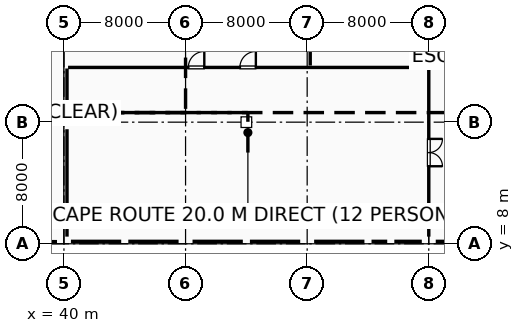
"""IFC4 building model, lengths in metres.
Left out: names, types, materials, properties, quantities, classifications, styles, units other than length and angle.
Written with IfcOpenShell. Run it as: python <this file> out.ifc"""

import sys

from ifc_helpers import new_model, si_unit, direction, frame, frame_2d, origin, origin_2d, place, context, subcontext, project, spatial, rectangle, circle, extrude, element, fill, save


model = new_model("IFC4")
c1 = context("Model", 3, precision=1e-05, world=origin(), true_north=direction((0.0, 1.0)))
c2 = subcontext(c1, "Body", "Model", "MODEL_VIEW")
j1 = project(units=[si_unit("LENGTHUNIT", "METRE"), si_unit("PLANEANGLEUNIT", "RADIAN")], contexts=[c1])
p1 = place(None, origin())
s1 = spatial("IfcSite", under=j1, at=p1, CompositionType="ELEMENT")
p2 = place(p1, origin())
s2 = spatial("IfcBuilding", under=s1, at=p2, CompositionType="ELEMENT")
p3 = place(p2, origin())
s3 = spatial("IfcBuildingStorey", under=s2, at=p3, CompositionType="ELEMENT", Elevation=0.0)
for number, where, z_axis, x_axis in (
    (1, (40.0, 8.0, 0.0), (0.0, 0.0, 1.0), (1.0, 0.0, 0.0)),
    (2, (40.0, 16.0, 0.0), (0.0, 0.0, 1.0), (1.0, 0.0, 0.0)),
):
    element("IfcColumn", number, at=place(p3, frame(where, z_axis=z_axis, x_axis=x_axis)), inside=s3, PredefinedType="COLUMN", context=c2, shape_type="SweptSolid", body=[
        extrude(rectangle(XDim=0.9, YDim=0.9, at=origin_2d()), origin(), (0.0, 0.0, 1.0), 5.4),
    ])
p4 = place(p3, frame((48.0, 8.0, 0.0), z_axis=(0.0, 0.0, 1.0), x_axis=(1.0, 0.0, 0.0)))
e3 = element("IfcColumn", 3, at=p4, inside=s3, PredefinedType="COLUMN", context=c2, shape_type="SweptSolid", body=[
    extrude(circle(Radius=0.45, at=origin_2d()), origin(), (0.0, 0.0, 1.0), 5.4),
])
p5 = place(p3, frame((48.0, 16.0, 0.0), z_axis=(0.0, 0.0, 1.0), x_axis=(1.0, 0.0, 0.0)))
e4 = element("IfcColumn", 4, at=p5, inside=s3, PredefinedType="COLUMN", context=c2, shape_type="SweptSolid", body=[
    extrude(rectangle(XDim=0.75, YDim=0.75, at=origin_2d()), origin(), (0.0, 0.0, 1.0), 5.4),
])
p6 = place(p3, frame((56.0, 8.0, 0.0), z_axis=(0.0, 0.0, 1.0), x_axis=(1.0, 0.0, 0.0)))
e5 = element("IfcColumn", 5, at=p6, inside=s3, PredefinedType="COLUMN", context=c2, shape_type="SweptSolid", body=[
    extrude(circle(Radius=0.45, at=origin_2d()), origin(), (0.0, 0.0, 1.0), 5.4),
])
p7 = place(p3, frame((56.0, 16.0, 0.0), z_axis=(0.0, 0.0, 1.0), x_axis=(1.0, 0.0, 0.0)))
e6 = element("IfcColumn", 6, at=p7, inside=s3, PredefinedType="COLUMN", context=c2, shape_type="SweptSolid", body=[
    extrude(rectangle(XDim=0.75, YDim=0.75, at=origin_2d()), origin(), (0.0, 0.0, 1.0), 5.4),
])
p8 = place(p3, frame((64.0, 8.0, 0.0), z_axis=(0.0, 0.0, 1.0), x_axis=(1.0, 0.0, 0.0)))
e7 = element("IfcColumn", 7, at=p8, inside=s3, PredefinedType="COLUMN", context=c2, shape_type="SweptSolid", body=[
    extrude(rectangle(XDim=0.9, YDim=0.9, at=origin_2d()), origin(), (0.0, 0.0, 1.0), 5.4),
])
for number, where, z_axis, x_axis in (
    (8, (44.0, 8.0, 0.0), (0.0, 0.0, 1.0), (1.0, 0.0, 0.0)),
    (9, (52.0, 8.0, 0.0), (0.0, 0.0, 1.0), (1.0, 0.0, 0.0)),
    (10, (60.0, 8.0, 0.0), (0.0, 0.0, 1.0), (1.0, 0.0, 0.0)),
):
    element("IfcColumn", number, at=place(p3, frame(where, z_axis=z_axis, x_axis=x_axis)), inside=s3, PredefinedType="COLUMN", context=c2, shape_type="SweptSolid", body=[
        extrude(rectangle(XDim=0.45, YDim=0.45, at=origin_2d()), origin(), (0.0, 0.0, 1.0), 5.4),
    ])
p9 = place(p3, frame((61.5, 8.0, 0.0), z_axis=(0.0, 0.0, 1.0), x_axis=(1.0, 0.0, 0.0)))
e11 = element("IfcColumn", 11, at=p9, inside=s3, PredefinedType="COLUMN", context=c2, shape_type="SweptSolid", body=[
    extrude(rectangle(XDim=0.45, YDim=0.45, at=origin_2d()), origin(), (0.0, 0.0, 1.0), 5.36),
])
p10 = place(p3, frame((71.342, 8.16, 0.0), z_axis=(0.0, 0.0, 1.0), x_axis=(-1.0, 0.0, 0.0)))
e12 = element("IfcWall", 12, at=p10, inside=s3, PredefinedType="STANDARD", context=c2, shape_type="SweptSolid", body=[
    extrude(rectangle(XDim=6.884, YDim=0.28, at=frame_2d((3.442, 0.0))), origin(), (0.0, 0.0, 1.0), 4.655),
])
p11 = place(p10, frame((2.542, 0.0, 0.95)))
e13 = element("IfcOpeningElement", 13, at=p11, cuts=e12, PredefinedType="OPENING", context=c2, shape_type="SweptSolid", body=[
    extrude(rectangle(XDim=1.8, YDim=1.2, at=frame_2d((0.9, 0.6))), frame((0.0, 0.15, 0.0), z_axis=(0.0, -1.0, 0.0), x_axis=(1.0, 0.0, 0.0)), (0.0, 0.0, 1.0), 0.3),
])
p12 = place(p3, frame((63.542, 8.16, 0.0), z_axis=(0.0, 0.0, 1.0), x_axis=(-1.0, 0.0, 0.0)))
e14 = element("IfcWall", 14, at=p12, inside=s3, PredefinedType="STANDARD", context=c2, shape_type="SweptSolid", body=[
    extrude(rectangle(XDim=1.809, YDim=0.28, at=frame_2d((0.905, 0.0))), origin(), (0.0, 0.0, 1.0), 5.12),
])
p13 = place(p3, frame((61.267, 8.16, 0.0), z_axis=(0.0, 0.0, 1.0), x_axis=(-1.0, 0.0, 0.0)))
e15 = element("IfcWall", 15, at=p13, inside=s3, PredefinedType="STANDARD", context=c2, shape_type="SweptSolid", body=[
    extrude(rectangle(XDim=1.034, YDim=0.28, at=frame_2d((0.517, 0.0))), origin(), (0.0, 0.0, 1.0), 5.12),
])
p14 = place(p3, frame((59.767, 8.16, 0.0), z_axis=(0.0, 0.0, 1.0), x_axis=(-1.0, 0.0, 0.0)))
e16 = element("IfcWall", 16, at=p14, inside=s3, PredefinedType="STANDARD", context=c2, shape_type="SweptSolid", body=[
    extrude(rectangle(XDim=3.309, YDim=0.28, at=frame_2d((1.655, 0.0))), origin(), (0.0, 0.0, 1.0), 4.455),
])
p15 = place(p3, frame((55.542, 8.16, 0.0), z_axis=(0.0, 0.0, 1.0), x_axis=(-1.0, 0.0, 0.0)))
e17 = element("IfcWall", 17, at=p15, inside=s3, PredefinedType="STANDARD", context=c2, shape_type="SweptSolid", body=[
    extrude(rectangle(XDim=3.309, YDim=0.28, at=frame_2d((1.655, 0.0))), origin(), (0.0, 0.0, 1.0), 4.355),
])
p16 = place(p3, frame((51.767, 8.16, 0.0), z_axis=(0.0, 0.0, 1.0), x_axis=(-1.0, 0.0, 0.0)))
e18 = element("IfcWall", 18, at=p16, inside=s3, PredefinedType="STANDARD", context=c2, shape_type="SweptSolid", body=[
    extrude(rectangle(XDim=3.309, YDim=0.28, at=frame_2d((1.655, 0.0))), origin(), (0.0, 0.0, 1.0), 4.255),
])
p17 = place(p3, frame((47.542, 8.16, 0.0), z_axis=(0.0, 0.0, 1.0), x_axis=(-1.0, 0.0, 0.0)))
e19 = element("IfcWall", 19, at=p17, inside=s3, PredefinedType="STANDARD", context=c2, shape_type="SweptSolid", body=[
    extrude(rectangle(XDim=3.309, YDim=0.28, at=frame_2d((1.655, 0.0))), origin(), (0.0, 0.0, 1.0), 4.105),
])
p18 = place(p3, frame((43.767, 8.16, 0.0), z_axis=(0.0, 0.0, 1.0), x_axis=(-1.0, 0.0, 0.0)))
e20 = element("IfcWall", 20, at=p18, inside=s3, PredefinedType="STANDARD", context=c2, shape_type="SweptSolid", body=[
    extrude(rectangle(XDim=3.309, YDim=0.28, at=frame_2d((1.655, 0.0))), origin(), (0.0, 0.0, 1.0), 4.655),
])
p19 = place(p3, frame((39.542, 8.14, 0.0), z_axis=(0.0, 0.0, 1.0), x_axis=(-1.0, 0.0, 0.0)))
e21 = element("IfcWall", 21, at=p19, inside=s3, PredefinedType="ELEMENTEDWALL", context=c2, shape_type="SweptSolid", body=[
    extrude(rectangle(XDim=3.37, YDim=0.24, at=frame_2d((1.685, 0.0))), origin(), (0.0, 0.0, 1.0), 4.605),
])
p20 = place(p3, frame((40.27, 19.6, 0.0), z_axis=(0.0, 0.0, 1.0), x_axis=(1.0, 0.0, 0.0)))
e22 = element("IfcWall", 22, at=p20, inside=s3, PredefinedType="PARTITIONING", context=c2, shape_type="SweptSolid", body=[
    extrude(rectangle(XDim=23.66, YDim=0.1, at=frame_2d((11.83, 0.0))), origin(), (0.0, 0.0, 1.0), 4.3),
])
p21 = place(p20, frame((11.305, 0.0, 0.0)))
e23 = element("IfcOpeningElement", 23, at=p21, cuts=e22, PredefinedType="OPENING", context=c2, shape_type="SweptSolid", body=[
    extrude(rectangle(XDim=1.05, YDim=2.15, at=frame_2d((0.525, 1.075))), frame((0.0, 0.06, 0.0), z_axis=(0.0, -1.0, 0.0), x_axis=(1.0, 0.0, 0.0)), (0.0, 0.0, 1.0), 0.12),
])
p22 = place(p20, frame((7.913, 0.0, 0.0)))
e24 = element("IfcOpeningElement", 24, at=p22, cuts=e22, PredefinedType="OPENING", context=c2, shape_type="SweptSolid", body=[
    extrude(rectangle(XDim=1.05, YDim=2.15, at=frame_2d((0.525, 1.075))), frame((0.0, 0.06, 0.0), z_axis=(0.0, -1.0, 0.0), x_axis=(1.0, 0.0, 0.0)), (0.0, 0.0, 1.0), 0.12),
])
p23 = place(p3, frame((64.0, 19.53, 0.0), z_axis=(0.0, 0.0, 1.0), x_axis=(0.0, -1.0, 0.0)))
e25 = element("IfcWall", 25, at=p23, inside=s3, PredefinedType="PARTITIONING", context=c2, shape_type="SweptSolid", body=[
    extrude(rectangle(XDim=11.06, YDim=0.1, at=frame_2d((5.53, 0.0))), origin(), (0.0, 0.0, 1.0), 4.3),
])
p24 = place(p23, frame((4.63, 0.0, 0.0)))
e26 = element("IfcOpeningElement", 26, at=p24, cuts=e25, PredefinedType="OPENING", context=c2, shape_type="SweptSolid", body=[
    extrude(rectangle(XDim=1.8, YDim=2.15, at=frame_2d((0.9, 1.075))), frame((0.0, 0.06, 0.0), z_axis=(0.0, -1.0, 0.0), x_axis=(1.0, 0.0, 0.0)), (0.0, 0.0, 1.0), 0.12),
])
p25 = place(p3, frame((40.2, 8.47, 0.0), z_axis=(0.0, 0.0, 1.0), x_axis=(0.0, 1.0, 0.0)))
e27 = element("IfcWall", 27, at=p25, inside=s3, PredefinedType="PARTITIONING", context=c2, shape_type="SweptSolid", body=[
    extrude(rectangle(XDim=7.065, YDim=0.1, at=frame_2d((3.532, 0.0))), origin(), (0.0, 0.0, 1.0), 4.6),
])
p26 = place(p3, frame((40.2, 16.465, 0.0), z_axis=(0.0, 0.0, 1.0), x_axis=(0.0, 1.0, 0.0)))
e28 = element("IfcWall", 28, at=p26, inside=s3, PredefinedType="PARTITIONING", context=c2, shape_type="SweptSolid", body=[
    extrude(rectangle(XDim=3.065, YDim=0.1, at=frame_2d((1.532, 0.0))), origin(), (0.0, 0.0, 1.0), 4.65),
])
p27 = place(p3, frame((56.2, 19.725, 0.0), z_axis=(0.0, 0.0, 1.0), x_axis=(0.0, 1.0, 0.0)))
e29 = element("IfcWall", 29, at=p27, inside=s3, PredefinedType="PARTITIONING", context=c2, shape_type="SweptSolid", body=[
    extrude(rectangle(XDim=3.885, YDim=0.15, at=frame_2d((1.942, 0.0))), origin(), (0.0, 0.0, 1.0), 4.45),
])
p28 = place(p27, frame((1.042, 0.0, 0.0)))
e30 = element("IfcOpeningElement", 30, at=p28, cuts=e29, PredefinedType="OPENING", context=c2, shape_type="SweptSolid", body=[
    extrude(rectangle(XDim=1.8, YDim=2.15, at=frame_2d((0.9, 1.075))), frame((0.0, 0.085, 0.0), z_axis=(0.0, -1.0, 0.0), x_axis=(1.0, 0.0, 0.0)), (0.0, 0.0, 1.0), 0.17),
])
p29 = place(p21, origin())
e31 = element("IfcDoor", 31, at=p29, inside=s3, OperationType="SINGLE_SWING_RIGHT", PredefinedType="DOOR", context=c2, shape_type="SweptSolid", body=[
    extrude(rectangle(XDim=1.05, YDim=2.15, at=frame_2d((0.525, 1.075))), frame((0.0, 0.025, 0.0), z_axis=(0.0, -1.0, 0.0), x_axis=(1.0, 0.0, 0.0)), (0.0, 0.0, 1.0), 0.05),
])
fill(e23, e31)
p30 = place(p22, origin())
e32 = element("IfcDoor", 32, at=p30, inside=s3, OperationType="SINGLE_SWING_RIGHT", PredefinedType="DOOR", context=c2, shape_type="SweptSolid", body=[
    extrude(rectangle(XDim=1.05, YDim=2.15, at=frame_2d((0.525, 1.075))), frame((0.0, 0.025, 0.0), z_axis=(0.0, -1.0, 0.0), x_axis=(1.0, 0.0, 0.0)), (0.0, 0.0, 1.0), 0.05),
])
fill(e24, e32)
p31 = place(p24, origin())
e33 = element("IfcDoor", 33, at=p31, inside=s3, OperationType="DOUBLE_DOOR_SINGLE_SWING", PredefinedType="DOOR", context=c2, shape_type="SweptSolid", body=[
    extrude(rectangle(XDim=1.8, YDim=2.15, at=frame_2d((0.9, 1.075))), frame((0.0, 0.025, 0.0), z_axis=(0.0, -1.0, 0.0), x_axis=(1.0, 0.0, 0.0)), (0.0, 0.0, 1.0), 0.05),
])
fill(e26, e33)
save(model, sys.argv[1])
